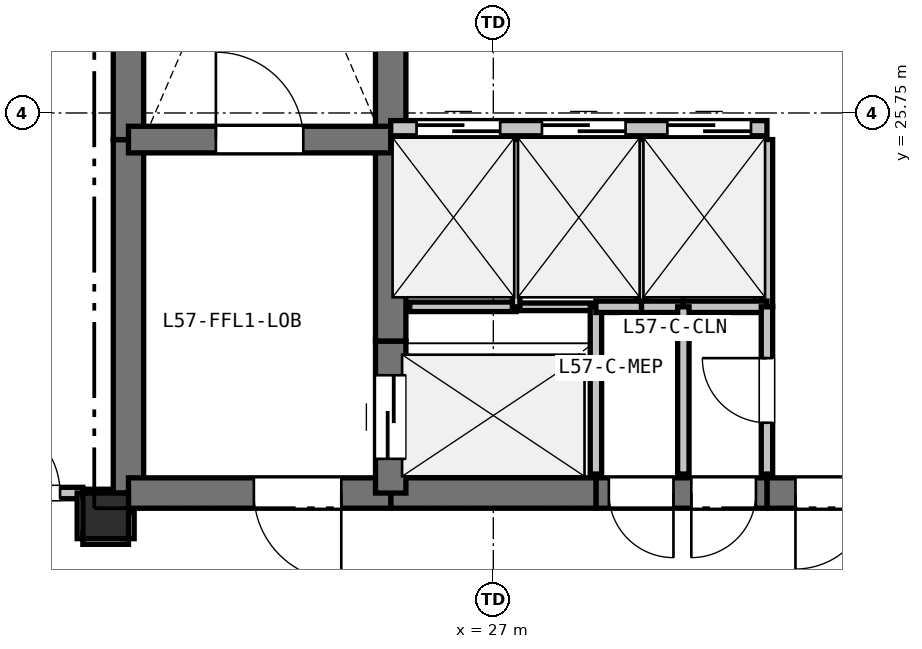
"""IFC4 building model, lengths in metres.
Left out: names, types, materials, properties, quantities, classifications, styles, units other than length and angle.
Written with IfcOpenShell. Run it as: python <this file> out.ifc"""

import sys

from ifc_helpers import new_model, si_unit, direction, frame, frame_2d, origin, origin_2d, place, context, subcontext, project, spatial, rectangle, extrude, element, fill, save


model = new_model("IFC4")
c1 = context("Model", 3, precision=1e-05, world=origin(), true_north=direction((0.0, 1.0)))
c2 = subcontext(c1, "Body", "Model", "MODEL_VIEW")
j1 = project(units=[si_unit("LENGTHUNIT", "METRE"), si_unit("PLANEANGLEUNIT", "RADIAN")], contexts=[c1])
p1 = place(None, origin())
s1 = spatial("IfcSite", under=j1, at=p1, CompositionType="ELEMENT")
p2 = place(p1, origin())
s2 = spatial("IfcBuilding", under=s1, at=p2, CompositionType="ELEMENT")
p3 = place(p2, frame((0.0, 0.0, 205.2)))
s3 = spatial("IfcBuildingStorey", under=s2, at=p3, CompositionType="ELEMENT", Elevation=205.2)
p4 = place(p3, frame((21.9, 20.45, 0.0), z_axis=(0.0, 0.0, 1.0), x_axis=(1.0, 0.0, 0.0)))
e1 = element("IfcColumn", 1, at=p4, inside=s3, PredefinedType="COLUMN", context=c2, shape_type="SweptSolid", body=[
    extrude(rectangle(XDim=0.6, YDim=0.6, at=origin_2d()), origin(), (0.0, 0.0, 1.0), 3.3),
])
p5 = place(p3, frame((22.2, 20.75, 0.0), z_axis=(0.0, 0.0, 1.0), x_axis=(0.0, 1.0, 0.0)))
e2 = element("IfcWall", 2, at=p5, inside=s3, PredefinedType="SHEAR", context=c2, shape_type="SweptSolid", body=[
    extrude(rectangle(XDim=4.65, YDim=0.4, at=frame_2d((2.325, 0.0))), origin(), (0.0, 0.0, 1.0), 3.07),
])
p6 = place(p3, frame((22.2, 25.4, 0.0), z_axis=(0.0, 0.0, 1.0), x_axis=(0.0, 1.0, 0.0)))
e3 = element("IfcWall", 3, at=p6, inside=s3, PredefinedType="SHEAR", context=c2, shape_type="SweptSolid", body=[
    extrude(rectangle(XDim=7.35, YDim=0.4, at=frame_2d((3.675, 0.0))), origin(), (0.0, 0.0, 1.0), 3.07),
])
p7 = place(p3, frame((32.35, 20.75, 0.0), z_axis=(0.0, 0.0, 1.0), x_axis=(-1.0, 0.0, 0.0)))
e4 = element("IfcWall", 4, at=p7, inside=s3, PredefinedType="SHEAR", context=c2, shape_type="SweptSolid", body=[
    extrude(rectangle(XDim=1.75, YDim=0.4, at=frame_2d((0.875, 0.0))), origin(), (0.0, 0.0, 1.0), 3.07),
])
p8 = place(p7, frame((0.375, 0.0, 0.0)))
e5 = element("IfcOpeningElement", 5, at=p8, cuts=e4, PredefinedType="OPENING", context=c2, shape_type="SweptSolid", body=[
    extrude(rectangle(XDim=1.0, YDim=2.15, at=frame_2d((0.5, 1.075))), frame((0.0, 0.21, 0.0), z_axis=(0.0, -1.0, 0.0), x_axis=(1.0, 0.0, 0.0)), (0.0, 0.0, 1.0), 0.42),
])
p9 = place(p3, frame((30.6, 20.75, 0.0), z_axis=(0.0, 0.0, 1.0), x_axis=(-1.0, 0.0, 0.0)))
e6 = element("IfcWall", 6, at=p9, inside=s3, PredefinedType="SHEAR", context=c2, shape_type="SweptSolid", body=[
    extrude(rectangle(XDim=2.25, YDim=0.4, at=frame_2d((1.125, 0.0))), origin(), (0.0, 0.0, 1.0), 3.07),
])
p10 = place(p9, frame((1.23, 0.0, 0.0)))
e7 = element("IfcOpeningElement", 7, at=p10, cuts=e6, PredefinedType="OPENING", context=c2, shape_type="SweptSolid", body=[
    extrude(rectangle(XDim=0.85, YDim=2.1, at=frame_2d((0.425, 1.05))), frame((0.0, 0.21, 0.0), z_axis=(0.0, -1.0, 0.0), x_axis=(1.0, 0.0, 0.0)), (0.0, 0.0, 1.0), 0.42),
])
p11 = place(p9, frame((0.145, 0.0, 0.0)))
e8 = element("IfcOpeningElement", 8, at=p11, cuts=e6, PredefinedType="OPENING", context=c2, shape_type="SweptSolid", body=[
    extrude(rectangle(XDim=0.85, YDim=2.1, at=frame_2d((0.425, 1.05))), frame((0.0, 0.21, 0.0), z_axis=(0.0, -1.0, 0.0), x_axis=(1.0, 0.0, 0.0)), (0.0, 0.0, 1.0), 0.42),
])
p12 = place(p3, frame((28.35, 20.75, 0.0), z_axis=(0.0, 0.0, 1.0), x_axis=(-1.0, 0.0, 0.0)))
e9 = element("IfcWall", 9, at=p12, inside=s3, PredefinedType="SHEAR", context=c2, shape_type="SweptSolid", body=[
    extrude(rectangle(XDim=2.7, YDim=0.4, at=frame_2d((1.35, 0.0))), origin(), (0.0, 0.0, 1.0), 3.07),
])
p13 = place(p3, frame((25.65, 20.75, 0.0), z_axis=(0.0, 0.0, 1.0), x_axis=(-1.0, 0.0, 0.0)))
e10 = element("IfcWall", 10, at=p13, inside=s3, PredefinedType="SHEAR", context=c2, shape_type="SweptSolid", body=[
    extrude(rectangle(XDim=3.45, YDim=0.4, at=frame_2d((1.725, 0.0))), origin(), (0.0, 0.0, 1.0), 3.07),
])
p14 = place(p13, frame((0.65, 0.0, 0.0)))
e11 = element("IfcOpeningElement", 11, at=p14, cuts=e10, PredefinedType="OPENING", context=c2, shape_type="SweptSolid", body=[
    extrude(rectangle(XDim=1.15, YDim=2.15, at=frame_2d((0.575, 1.075))), frame((0.0, 0.21, 0.0), z_axis=(0.0, -1.0, 0.0), x_axis=(1.0, 0.0, 0.0)), (0.0, 0.0, 1.0), 0.42),
])
p15 = place(p3, frame((25.65, 20.75, 0.0), z_axis=(0.0, 0.0, 1.0), x_axis=(0.0, 1.0, 0.0)))
e12 = element("IfcWall", 12, at=p15, inside=s3, PredefinedType="SHEAR", context=c2, shape_type="SweptSolid", body=[
    extrude(rectangle(XDim=2.0, YDim=0.4, at=frame_2d((1.0, 0.0))), origin(), (0.0, 0.0, 1.0), 3.07),
])
p16 = place(p15, frame((0.45, 0.0, 0.0)))
e13 = element("IfcOpeningElement", 13, at=p16, cuts=e12, PredefinedType="OPENING", context=c2, shape_type="SweptSolid", body=[
    extrude(rectangle(XDim=1.1, YDim=2.15, at=frame_2d((0.55, 1.075))), frame((0.0, 0.21, 0.0), z_axis=(0.0, -1.0, 0.0), x_axis=(1.0, 0.0, 0.0)), (0.0, 0.0, 1.0), 0.42),
])
p17 = place(p3, frame((25.65, 22.75, 0.0), z_axis=(0.0, 0.0, 1.0), x_axis=(0.0, 1.0, 0.0)))
e14 = element("IfcWall", 14, at=p17, inside=s3, PredefinedType="SHEAR", context=c2, shape_type="SweptSolid", body=[
    extrude(rectangle(XDim=2.8, YDim=0.4, at=frame_2d((1.4, 0.0))), origin(), (0.0, 0.0, 1.0), 3.07),
])
p18 = place(p3, frame((25.65, 25.55, 0.0), z_axis=(0.0, 0.0, 1.0), x_axis=(0.0, 1.0, 0.0)))
e15 = element("IfcWall", 15, at=p18, inside=s3, PredefinedType="SHEAR", context=c2, shape_type="SweptSolid", body=[
    extrude(rectangle(XDim=2.4, YDim=0.4, at=frame_2d((1.2, 0.0))), origin(), (0.0, 0.0, 1.0), 3.07),
])
p19 = place(p3, frame((22.2, 25.4, 0.0), z_axis=(0.0, 0.0, 1.0), x_axis=(1.0, 0.0, 0.0)))
e16 = element("IfcWall", 16, at=p19, inside=s3, PredefinedType="SHEAR", context=c2, shape_type="SweptSolid", body=[
    extrude(rectangle(XDim=3.45, YDim=0.35, at=frame_2d((1.725, 0.0))), origin(), (0.0, 0.0, 1.0), 3.07),
])
p20 = place(p19, frame((1.15, 0.0, 0.0)))
e17 = element("IfcOpeningElement", 17, at=p20, cuts=e16, PredefinedType="OPENING", context=c2, shape_type="SweptSolid", body=[
    extrude(rectangle(XDim=1.15, YDim=2.15, at=frame_2d((0.575, 1.075))), frame((0.0, 0.185, 0.0), z_axis=(0.0, -1.0, 0.0), x_axis=(1.0, 0.0, 0.0)), (0.0, 0.0, 1.0), 0.37),
])
p21 = place(p3, frame((25.65, 25.55, 0.0), z_axis=(0.0, 0.0, 1.0), x_axis=(1.0, 0.0, 0.0)))
e18 = element("IfcWall", 18, at=p21, inside=s3, PredefinedType="PARTITIONING", context=c2, shape_type="SweptSolid", body=[
    extrude(rectangle(XDim=4.95, YDim=0.2, at=frame_2d((2.475, 0.0))), origin(), (0.0, 0.0, 1.0), 3.07),
])
p22 = place(p21, frame((0.34, 0.0, 0.0)))
e19 = element("IfcOpeningElement", 19, at=p22, cuts=e18, PredefinedType="OPENING", context=c2, shape_type="SweptSolid", body=[
    extrude(rectangle(XDim=1.1, YDim=2.15, at=frame_2d((0.55, 1.075))), frame((0.0, 0.11, 0.0), z_axis=(0.0, -1.0, 0.0), x_axis=(1.0, 0.0, 0.0)), (0.0, 0.0, 1.0), 0.22),
])
p23 = place(p21, frame((1.99, 0.0, 0.0)))
e20 = element("IfcOpeningElement", 20, at=p23, cuts=e18, PredefinedType="OPENING", context=c2, shape_type="SweptSolid", body=[
    extrude(rectangle(XDim=1.1, YDim=2.15, at=frame_2d((0.55, 1.075))), frame((0.0, 0.11, 0.0), z_axis=(0.0, -1.0, 0.0), x_axis=(1.0, 0.0, 0.0)), (0.0, 0.0, 1.0), 0.22),
])
p24 = place(p21, frame((3.64, 0.0, 0.0)))
e21 = element("IfcOpeningElement", 21, at=p24, cuts=e18, PredefinedType="OPENING", context=c2, shape_type="SweptSolid", body=[
    extrude(rectangle(XDim=1.1, YDim=2.15, at=frame_2d((0.55, 1.075))), frame((0.0, 0.11, 0.0), z_axis=(0.0, -1.0, 0.0), x_axis=(1.0, 0.0, 0.0)), (0.0, 0.0, 1.0), 0.22),
])
p25 = place(p3, frame((25.9, 23.2, 0.0), z_axis=(0.0, 0.0, 1.0), x_axis=(1.0, 0.0, 0.0)))
e22 = element("IfcWall", 22, at=p25, inside=s3, PredefinedType="PARTITIONING", context=c2, shape_type="SweptSolid", body=[
    extrude(rectangle(XDim=1.4, YDim=0.125, at=frame_2d((0.7, 0.0))), origin(), (0.0, 0.0, 1.0), 3.07),
])
p26 = place(p3, frame((27.3, 23.2, 0.0), z_axis=(0.0, 0.0, 1.0), x_axis=(1.0, 0.0, 0.0)))
e23 = element("IfcWall", 23, at=p26, inside=s3, PredefinedType="PARTITIONING", context=c2, shape_type="SweptSolid", body=[
    extrude(rectangle(XDim=1.05, YDim=0.1, at=frame_2d((0.525, 0.0))), origin(), (0.0, 0.0, 1.0), 3.07),
])
p27 = place(p3, frame((28.35, 23.2, 0.0), z_axis=(0.0, 0.0, 1.0), x_axis=(0.0, -1.0, 0.0)))
e24 = element("IfcWall", 24, at=p27, inside=s3, PredefinedType="PARTITIONING", context=c2, shape_type="SweptSolid", body=[
    extrude(rectangle(XDim=2.2, YDim=0.15, at=frame_2d((1.1, 0.0))), origin(), (0.0, 0.0, 1.0), 3.07),
])
p28 = place(p3, frame((27.3, 25.4, 0.0), z_axis=(0.0, 0.0, 1.0), x_axis=(0.0, -1.0, 0.0)))
e25 = element("IfcWall", 25, at=p28, inside=s3, PredefinedType="PARTITIONING", context=c2, shape_type="SweptSolid", body=[
    extrude(rectangle(XDim=2.2, YDim=0.1, at=frame_2d((1.1, 0.0))), origin(), (0.0, 0.0, 1.0), 3.07),
])
p29 = place(p3, frame((28.95, 25.4, 0.0), z_axis=(0.0, 0.0, 1.0), x_axis=(0.0, -1.0, 0.0)))
e26 = element("IfcWall", 26, at=p29, inside=s3, PredefinedType="PARTITIONING", context=c2, shape_type="SweptSolid", body=[
    extrude(rectangle(XDim=2.2, YDim=0.125, at=frame_2d((1.1, 0.0))), origin(), (0.0, 0.0, 1.0), 3.07),
])
p30 = place(p3, frame((28.95, 23.2, 0.0), z_axis=(0.0, 0.0, 1.0), x_axis=(-1.0, 0.0, 0.0)))
e27 = element("IfcWall", 27, at=p30, inside=s3, PredefinedType="PARTITIONING", context=c2, shape_type="SweptSolid", body=[
    extrude(rectangle(XDim=0.6, YDim=0.15, at=frame_2d((0.3, 0.0))), origin(), (0.0, 0.0, 1.0), 3.07),
])
p31 = place(p3, frame((30.6, 25.4, 0.0), z_axis=(0.0, 0.0, 1.0), x_axis=(0.0, -1.0, 0.0)))
e28 = element("IfcWall", 28, at=p31, inside=s3, PredefinedType="PARTITIONING", context=c2, shape_type="SweptSolid", body=[
    extrude(rectangle(XDim=2.2, YDim=0.15, at=frame_2d((1.1, 0.0))), origin(), (0.0, 0.0, 1.0), 3.07),
])
p32 = place(p3, frame((30.6, 23.2, 0.0), z_axis=(0.0, 0.0, 1.0), x_axis=(-1.0, 0.0, 0.0)))
e29 = element("IfcWall", 29, at=p32, inside=s3, PredefinedType="PARTITIONING", context=c2, shape_type="SweptSolid", body=[
    extrude(rectangle(XDim=1.1, YDim=0.15, at=frame_2d((0.55, 0.0))), origin(), (0.0, 0.0, 1.0), 3.07),
])
p33 = place(p3, frame((29.5, 23.2, 0.0), z_axis=(0.0, 0.0, 1.0), x_axis=(-1.0, 0.0, 0.0)))
e30 = element("IfcWall", 30, at=p33, inside=s3, PredefinedType="PARTITIONING", context=c2, shape_type="SweptSolid", body=[
    extrude(rectangle(XDim=0.55, YDim=0.15, at=frame_2d((0.275, 0.0))), origin(), (0.0, 0.0, 1.0), 3.07),
])
p34 = place(p3, frame((30.6, 21.0, 0.0), z_axis=(0.0, 0.0, 1.0), x_axis=(0.0, 1.0, 0.0)))
e31 = element("IfcWall", 31, at=p34, inside=s3, PredefinedType="PARTITIONING", context=c2, shape_type="SweptSolid", body=[
    extrude(rectangle(XDim=2.2, YDim=0.15, at=frame_2d((1.1, 0.0))), origin(), (0.0, 0.0, 1.0), 3.07),
])
p35 = place(p34, frame((0.675, 0.0, 0.0)))
e32 = element("IfcOpeningElement", 32, at=p35, cuts=e31, PredefinedType="OPENING", context=c2, shape_type="SweptSolid", body=[
    extrude(rectangle(XDim=0.85, YDim=2.1, at=frame_2d((0.425, 1.05))), frame((0.0, 0.085, 0.0), z_axis=(0.0, -1.0, 0.0), x_axis=(1.0, 0.0, 0.0)), (0.0, 0.0, 1.0), 0.17),
])
p36 = place(p3, frame((20.0, 20.75, 0.0), z_axis=(0.0, 0.0, 1.0), x_axis=(1.0, 0.0, 0.0)))
e33 = element("IfcWall", 33, at=p36, inside=s3, PredefinedType="PARTITIONING", context=c2, shape_type="SweptSolid", body=[
    extrude(rectangle(XDim=1.6, YDim=0.15, at=frame_2d((0.8, 0.0))), origin(), (0.0, 0.0, 1.0), 2.518),
])
p37 = place(p36, frame((0.3, 0.0, 0.0)))
e34 = element("IfcOpeningElement", 34, at=p37, cuts=e33, PredefinedType="OPENING", context=c2, shape_type="SweptSolid", body=[
    extrude(rectangle(XDim=1.0, YDim=2.15, at=frame_2d((0.5, 1.075))), frame((0.0, 0.085, 0.0), z_axis=(0.0, -1.0, 0.0), x_axis=(1.0, 0.0, 0.0)), (0.0, 0.0, 1.0), 0.17),
])
p38 = place(p3, frame((21.6, 20.75, 0.0), z_axis=(0.0, 0.0, 1.0), x_axis=(0.0, -1.0, 0.0)))
e35 = element("IfcWall", 35, at=p38, inside=s3, PredefinedType="PARTITIONING", context=c2, shape_type="SweptSolid", body=[
    extrude(rectangle(XDim=0.6, YDim=0.15, at=frame_2d((0.3, 0.0))), origin(), (0.0, 0.0, 1.0), 2.518),
])
p39 = place(p3, frame((21.6, 20.15, 0.0), z_axis=(0.0, 0.0, 1.0), x_axis=(1.0, 0.0, 0.0)))
e36 = element("IfcWall", 36, at=p39, inside=s3, PredefinedType="PARTITIONING", context=c2, shape_type="SweptSolid", body=[
    extrude(rectangle(XDim=0.6, YDim=0.15, at=frame_2d((0.3, 0.0))), origin(), (0.0, 0.0, 1.0), 2.518),
])
p40 = place(p3, frame((22.2, 20.15, 0.0), z_axis=(0.0, 0.0, 1.0), x_axis=(0.0, 1.0, 0.0)))
e37 = element("IfcWall", 37, at=p40, inside=s3, PredefinedType="PARTITIONING", context=c2, shape_type="SweptSolid", body=[
    extrude(rectangle(XDim=0.35, YDim=0.15, at=frame_2d((0.175, 0.0))), origin(), (0.0, 0.0, 1.0), 2.518),
])
p41 = place(p3, frame((29.5, 23.2, 0.0), z_axis=(0.0, 0.0, 1.0), x_axis=(0.0, -1.0, 0.0)))
e38 = element("IfcWall", 38, at=p41, inside=s3, PredefinedType="PARTITIONING", context=c2, shape_type="SweptSolid", body=[
    extrude(rectangle(XDim=2.2, YDim=0.15, at=frame_2d((1.1, 0.0))), origin(), (0.0, 0.0, 1.0), 3.07),
])
p42 = place(p3, frame((21.95, 20.75, 0.0), z_axis=(0.0, 0.0, 1.0), x_axis=(-1.0, 0.0, 0.0)))
e39 = element("IfcWall", 39, at=p42, inside=s3, PredefinedType="PARTITIONING", context=c2, shape_type="SweptSolid", body=[
    extrude(rectangle(XDim=0.35, YDim=0.1, at=frame_2d((0.175, 0.0))), origin(), (0.0, 0.0, 1.0), 2.595),
])
p43 = place(p22, origin())
e40 = element("IfcDoor", 40, at=p43, inside=s3, OperationType="SLIDING_TO_LEFT", PredefinedType="DOOR", context=c2, shape_type="SweptSolid", body=[
    extrude(rectangle(XDim=1.1, YDim=2.15, at=frame_2d((0.55, 1.075))), frame((0.0, 0.025, 0.0), z_axis=(0.0, -1.0, 0.0), x_axis=(1.0, 0.0, 0.0)), (0.0, 0.0, 1.0), 0.05),
])
fill(e19, e40)
p44 = place(p23, origin())
e41 = element("IfcDoor", 41, at=p44, inside=s3, OperationType="SLIDING_TO_LEFT", PredefinedType="DOOR", context=c2, shape_type="SweptSolid", body=[
    extrude(rectangle(XDim=1.1, YDim=2.15, at=frame_2d((0.55, 1.075))), frame((0.0, 0.025, 0.0), z_axis=(0.0, -1.0, 0.0), x_axis=(1.0, 0.0, 0.0)), (0.0, 0.0, 1.0), 0.05),
])
fill(e20, e41)
p45 = place(p24, origin())
e42 = element("IfcDoor", 42, at=p45, inside=s3, OperationType="SLIDING_TO_LEFT", PredefinedType="DOOR", context=c2, shape_type="SweptSolid", body=[
    extrude(rectangle(XDim=1.1, YDim=2.15, at=frame_2d((0.55, 1.075))), frame((0.0, 0.025, 0.0), z_axis=(0.0, -1.0, 0.0), x_axis=(1.0, 0.0, 0.0)), (0.0, 0.0, 1.0), 0.05),
])
fill(e21, e42)
p46 = place(p8, origin())
e43 = element("IfcDoor", 43, at=p46, inside=s3, OperationType="SINGLE_SWING_RIGHT", PredefinedType="DOOR", context=c2, shape_type="SweptSolid", body=[
    extrude(rectangle(XDim=1.0, YDim=2.15, at=frame_2d((0.5, 1.075))), frame((0.0, 0.025, 0.0), z_axis=(0.0, -1.0, 0.0), x_axis=(1.0, 0.0, 0.0)), (0.0, 0.0, 1.0), 0.05),
])
fill(e5, e43)
p47 = place(p16, origin())
e44 = element("IfcDoor", 44, at=p47, inside=s3, OperationType="SLIDING_TO_LEFT", PredefinedType="DOOR", context=c2, shape_type="SweptSolid", body=[
    extrude(rectangle(XDim=1.1, YDim=2.15, at=frame_2d((0.55, 1.075))), frame((0.0, 0.025, 0.0), z_axis=(0.0, -1.0, 0.0), x_axis=(1.0, 0.0, 0.0)), (0.0, 0.0, 1.0), 0.05),
])
fill(e13, e44)
p48 = place(p20, origin())
e45 = element("IfcDoor", 45, at=p48, inside=s3, OperationType="SINGLE_SWING_LEFT", PredefinedType="DOOR", context=c2, shape_type="SweptSolid", body=[
    extrude(rectangle(XDim=1.15, YDim=2.15, at=frame_2d((0.575, 1.075))), frame((0.0, 0.025, 0.0), z_axis=(0.0, -1.0, 0.0), x_axis=(1.0, 0.0, 0.0)), (0.0, 0.0, 1.0), 0.05),
])
fill(e17, e45)
p49 = place(p14, origin())
e46 = element("IfcDoor", 46, at=p49, inside=s3, OperationType="SINGLE_SWING_LEFT", PredefinedType="DOOR", context=c2, shape_type="SweptSolid", body=[
    extrude(rectangle(XDim=1.15, YDim=2.15, at=frame_2d((0.575, 1.075))), frame((0.0, 0.025, 0.0), z_axis=(0.0, -1.0, 0.0), x_axis=(1.0, 0.0, 0.0)), (0.0, 0.0, 1.0), 0.05),
])
fill(e11, e46)
p50 = place(p35, origin())
e47 = element("IfcDoor", 47, at=p50, inside=s3, OperationType="SINGLE_SWING_RIGHT", PredefinedType="DOOR", context=c2, shape_type="SweptSolid", body=[
    extrude(rectangle(XDim=0.85, YDim=2.1, at=frame_2d((0.425, 1.05))), frame((0.0, 0.025, 0.0), z_axis=(0.0, -1.0, 0.0), x_axis=(1.0, 0.0, 0.0)), (0.0, 0.0, 1.0), 0.05),
])
fill(e32, e47)
p51 = place(p10, origin())
e48 = element("IfcDoor", 48, at=p51, inside=s3, OperationType="SINGLE_SWING_LEFT", PredefinedType="DOOR", context=c2, shape_type="SweptSolid", body=[
    extrude(rectangle(XDim=0.85, YDim=2.1, at=frame_2d((0.425, 1.05))), frame((0.0, 0.025, 0.0), z_axis=(0.0, -1.0, 0.0), x_axis=(1.0, 0.0, 0.0)), (0.0, 0.0, 1.0), 0.05),
])
fill(e7, e48)
p52 = place(p11, origin())
e49 = element("IfcDoor", 49, at=p52, inside=s3, OperationType="SINGLE_SWING_RIGHT", PredefinedType="DOOR", context=c2, shape_type="SweptSolid", body=[
    extrude(rectangle(XDim=0.85, YDim=2.1, at=frame_2d((0.425, 1.05))), frame((0.0, 0.025, 0.0), z_axis=(0.0, -1.0, 0.0), x_axis=(1.0, 0.0, 0.0)), (0.0, 0.0, 1.0), 0.05),
])
fill(e8, e49)
p53 = place(p37, origin())
e50 = element("IfcDoor", 50, at=p53, inside=s3, OperationType="SINGLE_SWING_LEFT", PredefinedType="DOOR", context=c2, shape_type="SweptSolid", body=[
    extrude(rectangle(XDim=1.0, YDim=2.15, at=frame_2d((0.5, 1.075))), frame((0.0, 0.025, 0.0), z_axis=(0.0, -1.0, 0.0), x_axis=(1.0, 0.0, 0.0)), (0.0, 0.0, 1.0), 0.05),
])
fill(e34, e50)
save(model, sys.argv[1])
